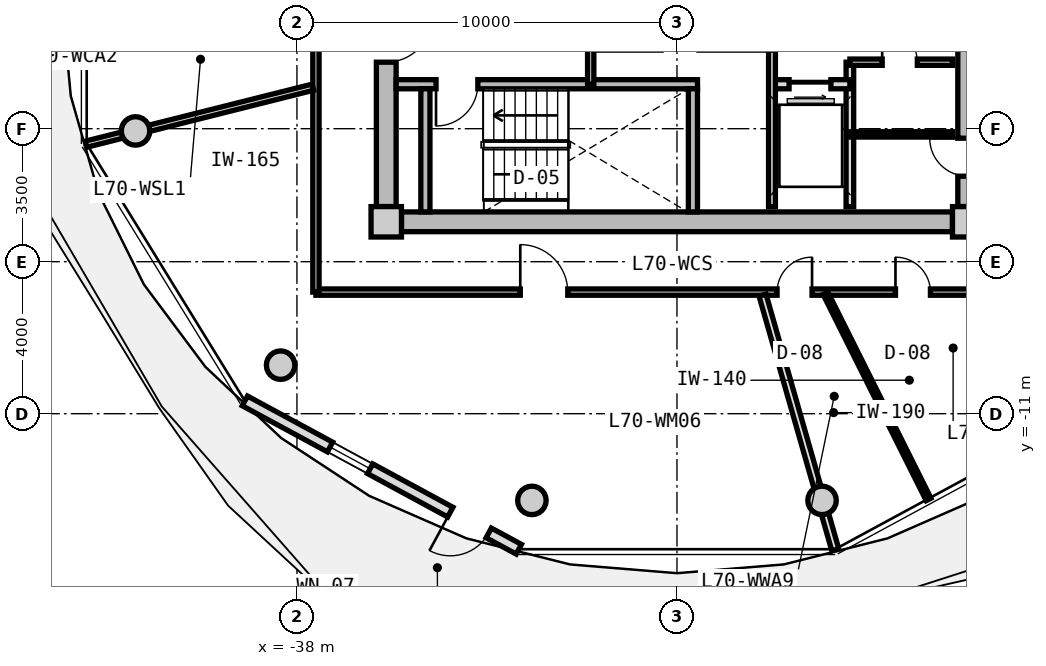
"""IFC4 building model, lengths in metres.
Left out: names, types, materials, properties, quantities, classifications, styles, units other than length and angle.
Written with IfcOpenShell. Run it as: python <this file> out.ifc"""

import sys

from ifc_helpers import new_model, si_unit, direction, frame, frame_2d, origin, origin_2d, place, context, subcontext, project, spatial, rectangle, circle, extrude, source, transform, mapped, element, fill, save


model = new_model("IFC4")
c1 = context("Model", 3, precision=1e-05, world=origin(), true_north=direction((0.0, 1.0)))
c2 = subcontext(c1, "Body", "Model", "MODEL_VIEW")
j1 = project(units=[si_unit("LENGTHUNIT", "METRE"), si_unit("PLANEANGLEUNIT", "RADIAN")], contexts=[c1])
p1 = place(None, origin())
s1 = spatial("IfcSite", under=j1, at=p1, CompositionType="ELEMENT")
p2 = place(p1, origin())
s2 = spatial("IfcBuilding", under=s1, at=p2, CompositionType="ELEMENT")
p3 = place(p2, frame((0.0, 0.0, 226.1)))
s3 = spatial("IfcBuildingStorey", under=s2, at=p3, CompositionType="ELEMENT", Elevation=226.1)
m1 = source(origin(), c2, "Body", "SweptSolid", [
    extrude(rectangle(XDim=0.8, YDim=0.8, at=origin_2d()), origin(), (0.0, 0.0, 1.0), 3.05),
])
for number, where, z_axis, x_axis in (
    (1, (-35.65, -5.95, 0.0), (0.0, 0.0, 1.0), (1.0, 0.0, 0.0)),
    (2, (-20.35, -5.95, 0.0), (0.0, 0.0, 1.0), (1.0, 0.0, 0.0)),
):
    element("IfcColumn", number, at=place(p3, frame(where, z_axis=z_axis, x_axis=x_axis)), inside=s3, PredefinedType="COLUMN", context=c2, shape_type="MappedRepresentation", body=[
        mapped(m1, transform((0.0, 0.0, 0.0), x_axis=(1.0, 0.0, 0.0), y_axis=(0.0, 1.0, 0.0), z_axis=(0.0, 0.0, 1.0), scale=1.0)),
    ])
m2 = source(origin(), c2, "Body", "SweptSolid", [
    extrude(rectangle(XDim=14.5, YDim=0.52, at=frame_2d((7.25, 0.0))), origin(), (0.0, 0.0, 1.0), 2.76),
])
p4 = place(p3, frame((-20.75, -5.95, 0.0), z_axis=(0.0, 0.0, 1.0), x_axis=(-1.0, 0.0, 0.0)))
e3 = element("IfcWall", 3, at=p4, inside=s3, PredefinedType="SHEAR", context=c2, shape_type="MappedRepresentation", body=[
    mapped(m2, transform((0.0, 0.0, 0.0), x_axis=(1.0, 0.0, 0.0), y_axis=(0.0, 1.0, 0.0), z_axis=(0.0, 0.0, 1.0), scale=1.0)),
])
m3 = source(origin(), c2, "Body", "SweptSolid", [
    extrude(rectangle(XDim=11.1, YDim=0.52, at=frame_2d((5.55, 0.0))), origin(), (0.0, 0.0, 1.0), 2.76),
])
p5 = place(p3, frame((-35.65, -5.55, 0.0), z_axis=(0.0, 0.0, 1.0), x_axis=(0.0, 1.0, 0.0)))
e4 = element("IfcWall", 4, at=p5, inside=s3, PredefinedType="SHEAR", context=c2, shape_type="MappedRepresentation", body=[
    mapped(m3, transform((0.0, 0.0, 0.0), x_axis=(1.0, 0.0, 0.0), y_axis=(0.0, 1.0, 0.0), z_axis=(0.0, 0.0, 1.0), scale=1.0)),
])
p6 = place(p5, frame((3.8, 0.0, 0.0)))
e5 = element("IfcOpeningElement", 5, at=p6, cuts=e4, PredefinedType="OPENING", context=c2, shape_type="SweptSolid", body=[
    extrude(rectangle(XDim=1.2, YDim=2.15, at=frame_2d((0.6, 1.075))), frame((0.0, 0.27, 0.0), z_axis=(0.0, -1.0, 0.0), x_axis=(1.0, 0.0, 0.0)), (0.0, 0.0, 1.0), 0.54),
])
p7 = place(p3, frame((-20.35, 5.55, 0.0), z_axis=(0.0, 0.0, 1.0), x_axis=(0.0, -1.0, 0.0)))
e6 = element("IfcWall", 6, at=p7, inside=s3, PredefinedType="SHEAR", context=c2, shape_type="MappedRepresentation", body=[
    mapped(m3, transform((0.0, 0.0, 0.0), x_axis=(1.0, 0.0, 0.0), y_axis=(0.0, 1.0, 0.0), z_axis=(0.0, 0.0, 1.0), scale=1.0)),
])
p8 = place(p7, frame((5.65, 0.0, 0.0)))
e7 = element("IfcOpeningElement", 7, at=p8, cuts=e6, PredefinedType="OPENING", context=c2, shape_type="SweptSolid", body=[
    extrude(rectangle(XDim=1.2, YDim=2.15, at=frame_2d((0.6, 1.075))), frame((0.0, 0.27, 0.0), z_axis=(0.0, -1.0, 0.0), x_axis=(1.0, 0.0, 0.0)), (0.0, 0.0, 1.0), 0.54),
])
p9 = place(p7, frame((9.3, 0.0, 0.0)))
e8 = element("IfcOpeningElement", 8, at=p9, cuts=e6, PredefinedType="OPENING", context=c2, shape_type="SweptSolid", body=[
    extrude(rectangle(XDim=1.0, YDim=2.1, at=frame_2d((0.5, 1.05))), frame((0.0, 0.27, 0.0), z_axis=(0.0, -1.0, 0.0), x_axis=(1.0, 0.0, 0.0)), (0.0, 0.0, 1.0), 0.54),
])
m4 = source(origin(), c2, "Body", "SweptSolid", [
    extrude(circle(Radius=0.375, at=origin_2d()), origin(), (0.0, 0.0, 1.0), 3.05),
])
for number, where, z_axis, x_axis in (
    (9, (-42.247, -3.559, 0.0), (0.0, 0.0, 1.0), (1.0, 0.0, 0.0)),
    (10, (-38.43, -9.723, 0.0), (0.0, 0.0, 1.0), (1.0, 0.0, 0.0)),
    (11, (-31.818, -13.281, 0.0), (0.0, 0.0, 1.0), (1.0, 0.0, 0.0)),
    (12, (-24.182, -13.281, 0.0), (0.0, 0.0, 1.0), (1.0, 0.0, 0.0)),
):
    element("IfcColumn", number, at=place(p3, frame(where, z_axis=z_axis, x_axis=x_axis)), inside=s3, PredefinedType="COLUMN", context=c2, shape_type="MappedRepresentation", body=[
        mapped(m4, transform((0.0, 0.0, 0.0), x_axis=(1.0, 0.0, 0.0), y_axis=(0.0, 1.0, 0.0), z_axis=(0.0, 0.0, 1.0), scale=1.0)),
    ])
m5 = source(origin(), c2, "Body", "SweptSolid", [
    extrude(rectangle(XDim=8.197, YDim=0.29, at=frame_2d((4.099, 0.0))), origin(), (0.0, 0.0, 1.0), 2.76),
])
p10 = place(p3, frame((-32.162, -14.566, 0.0), z_axis=(0.0, 0.0, 1.0), x_axis=(-0.879369910001, 0.476139224791, 0.0)))
e13 = element("IfcWall", 13, at=p10, inside=s3, PredefinedType="SOLIDWALL", context=c2, shape_type="MappedRepresentation", body=[
    mapped(m5, transform((0.0, 0.0, 0.0), x_axis=(1.0, 0.0, 0.0), y_axis=(0.0, 1.0, 0.0), z_axis=(0.0, 0.0, 1.0), scale=1.0)),
])
p11 = place(p10, frame((0.9, 0.0, 0.0)))
e14 = element("IfcOpeningElement", 14, at=p11, cuts=e13, PredefinedType="OPENING", context=c2, shape_type="SweptSolid", body=[
    extrude(rectangle(XDim=1.15, YDim=2.25, at=frame_2d((0.575, 1.125))), frame((0.0, 0.155, 0.0), z_axis=(0.0, -1.0, 0.0), x_axis=(1.0, 0.0, 0.0)), (0.0, 0.0, 1.0), 0.31),
])
p12 = place(p10, frame((4.448, 0.0, 0.85)))
e15 = element("IfcOpeningElement", 15, at=p12, cuts=e13, PredefinedType="OPENING", context=c2, shape_type="SweptSolid", body=[
    extrude(rectangle(XDim=1.2, YDim=1.5, at=frame_2d((0.6, 0.75))), frame((0.0, 0.155, 0.0), z_axis=(0.0, -1.0, 0.0), x_axis=(1.0, 0.0, 0.0)), (0.0, 0.0, 1.0), 0.31),
])
m6 = source(origin(), c2, "Body", "SweptSolid", [
    extrude(rectangle(XDim=7.93, YDim=0.24, at=frame_2d((3.965, 0.0))), origin(), (0.0, 0.0, 1.0), 2.76),
])
p13 = place(p3, frame((-35.39, -2.33, 0.0), z_axis=(0.0, 0.0, 1.0), x_axis=(1.0, 0.0, 0.0)))
e16 = element("IfcWall", 16, at=p13, inside=s3, PredefinedType="PARTITIONING", context=c2, shape_type="MappedRepresentation", body=[
    mapped(m6, transform((0.0, 0.0, 0.0), x_axis=(1.0, 0.0, 0.0), y_axis=(0.0, 1.0, 0.0), z_axis=(0.0, 0.0, 1.0), scale=1.0)),
])
p14 = place(p13, frame((1.05, 0.0, 0.0)))
e17 = element("IfcOpeningElement", 17, at=p14, cuts=e16, PredefinedType="OPENING", context=c2, shape_type="SweptSolid", body=[
    extrude(rectangle(XDim=1.1, YDim=2.15, at=frame_2d((0.55, 1.075))), frame((0.0, 0.13, 0.0), z_axis=(0.0, -1.0, 0.0), x_axis=(1.0, 0.0, 0.0)), (0.0, 0.0, 1.0), 0.26),
])
m7 = source(origin(), c2, "Body", "SweptSolid", [
    extrude(rectangle(XDim=3.24, YDim=0.24, at=frame_2d((1.62, 0.0))), origin(), (0.0, 0.0, 1.0), 2.76),
])
for number, where, z_axis, x_axis in (
    (18, (-34.62, -5.69, 0.0), (0.0, 0.0, 1.0), (0.0, 1.0, 0.0)),
    (19, (-27.58, -5.69, 0.0), (0.0, 0.0, 1.0), (0.0, 1.0, 0.0)),
):
    element("IfcWall", number, at=place(p3, frame(where, z_axis=z_axis, x_axis=x_axis)), inside=s3, PredefinedType="PARTITIONING", context=c2, shape_type="MappedRepresentation", body=[
        mapped(m7, transform((0.0, 0.0, 0.0), x_axis=(1.0, 0.0, 0.0), y_axis=(0.0, 1.0, 0.0), z_axis=(0.0, 0.0, 1.0), scale=1.0)),
    ])
m8 = source(origin(), c2, "Body", "SweptSolid", [
    extrude(rectangle(XDim=3.8, YDim=0.2, at=frame_2d((1.9, 0.0))), origin(), (0.0, 0.0, 1.0), 2.745),
])
p15 = place(p3, frame((-23.45, -5.55, 0.0), z_axis=(0.0, 0.0, 1.0), x_axis=(0.0, 1.0, 0.0)))
e20 = element("IfcWall", 20, at=p15, inside=s3, PredefinedType="PARTITIONING", context=c2, shape_type="MappedRepresentation", body=[
    mapped(m8, transform((0.0, 0.0, 0.0), x_axis=(1.0, 0.0, 0.0), y_axis=(0.0, 1.0, 0.0), z_axis=(0.0, 0.0, 1.0), scale=1.0)),
])
m9 = source(origin(), c2, "Body", "SweptSolid", [
    extrude(rectangle(XDim=2.05, YDim=0.24, at=frame_2d((1.025, 0.0))), origin(), (0.0, 0.0, 1.0), 2.745),
])
p16 = place(p3, frame((-25.5, -2.33, 0.0), z_axis=(0.0, 0.0, 1.0), x_axis=(1.0, 0.0, 0.0)))
e21 = element("IfcWall", 21, at=p16, inside=s3, PredefinedType="PARTITIONING", context=c2, shape_type="MappedRepresentation", body=[
    mapped(m9, transform((0.0, 0.0, 0.0), x_axis=(1.0, 0.0, 0.0), y_axis=(0.0, 1.0, 0.0), z_axis=(0.0, 0.0, 1.0), scale=1.0)),
])
p17 = place(p16, frame((0.45, 0.0, 0.0)))
e22 = element("IfcOpeningElement", 22, at=p17, cuts=e21, PredefinedType="OPENING", context=c2, shape_type="SweptSolid", body=[
    extrude(rectangle(XDim=1.1, YDim=2.2, at=frame_2d((0.55, 1.1))), frame((0.0, 0.13, 0.0), z_axis=(0.0, -1.0, 0.0), x_axis=(1.0, 0.0, 0.0)), (0.0, 0.0, 1.0), 0.26),
])
m10 = source(origin(), c2, "Body", "SweptSolid", [
    extrude(rectangle(XDim=4.2, YDim=0.18, at=frame_2d((2.1, 0.0))), origin(), (0.0, 0.0, 1.0), 2.745),
])
p18 = place(p3, frame((-25.5, -5.55, 0.0), z_axis=(0.0, 0.0, 1.0), x_axis=(0.0, 1.0, 0.0)))
e23 = element("IfcWall", 23, at=p18, inside=s3, PredefinedType="PARTITIONING", context=c2, shape_type="MappedRepresentation", body=[
    mapped(m10, transform((0.0, 0.0, 0.0), x_axis=(1.0, 0.0, 0.0), y_axis=(0.0, 1.0, 0.0), z_axis=(0.0, 0.0, 1.0), scale=1.0)),
])
m11 = source(origin(), c2, "Body", "SweptSolid", [
    extrude(rectangle(XDim=0.98, YDim=0.165, at=frame_2d((0.49, 0.0))), origin(), (0.0, 0.0, 1.0), 2.745),
])
p19 = place(p3, frame((-30.27, -2.33, 0.0), z_axis=(0.0, 0.0, 1.0), x_axis=(0.0, 1.0, 0.0)))
e24 = element("IfcWall", 24, at=p19, inside=s3, PredefinedType="PARTITIONING", context=c2, shape_type="MappedRepresentation", body=[
    mapped(m11, transform((0.0, 0.0, 0.0), x_axis=(1.0, 0.0, 0.0), y_axis=(0.0, 1.0, 0.0), z_axis=(0.0, 0.0, 1.0), scale=1.0)),
])
m12 = source(origin(), c2, "Body", "SweptSolid", [
    extrude(rectangle(XDim=2.7, YDim=0.165, at=frame_2d((1.35, 0.0))), origin(), (0.0, 0.0, 1.0), 2.745),
])
p20 = place(p3, frame((-23.45, -1.75, 0.0), z_axis=(0.0, 0.0, 1.0), x_axis=(1.0, 0.0, 0.0)))
e25 = element("IfcWall", 25, at=p20, inside=s3, PredefinedType="PARTITIONING", context=c2, shape_type="MappedRepresentation", body=[
    mapped(m12, transform((0.0, 0.0, 0.0), x_axis=(1.0, 0.0, 0.0), y_axis=(0.0, 1.0, 0.0), z_axis=(0.0, 0.0, 1.0), scale=1.0)),
])
p21 = place(p20, frame((0.85, 0.0, 0.0)))
e26 = element("IfcOpeningElement", 26, at=p21, cuts=e25, PredefinedType="OPENING", context=c2, shape_type="SweptSolid", body=[
    extrude(rectangle(XDim=0.925, YDim=2.1, at=frame_2d((0.462, 1.05))), frame((0.0, 0.093, 0.0), z_axis=(0.0, -1.0, 0.0), x_axis=(1.0, 0.0, 0.0)), (0.0, 0.0, 1.0), 0.185),
])
m13 = source(origin(), c2, "Body", "SweptSolid", [
    extrude(rectangle(XDim=2.7, YDim=0.14, at=frame_2d((1.35, 0.0))), origin(), (0.0, 0.0, 1.0), 2.745),
])
p22 = place(p3, frame((-23.45, -3.65, 0.0), z_axis=(0.0, 0.0, 1.0), x_axis=(1.0, 0.0, 0.0)))
e27 = element("IfcWall", 27, at=p22, inside=s3, PredefinedType="PARTITIONING", context=c2, shape_type="MappedRepresentation", body=[
    mapped(m13, transform((0.0, 0.0, 0.0), x_axis=(1.0, 0.0, 0.0), y_axis=(0.0, 1.0, 0.0), z_axis=(0.0, 0.0, 1.0), scale=1.0)),
])
m14 = source(origin(), c2, "Body", "SweptSolid", [
    extrude(rectangle(XDim=19.0, YDim=0.165, at=frame_2d((9.5, 0.0))), origin(), (0.0, 0.0, 1.0), 2.745),
])
p23 = place(p3, frame((-18.5, -7.8, 0.0), z_axis=(0.0, 0.0, 1.0), x_axis=(-1.0, 0.0, 0.0)))
e28 = element("IfcWall", 28, at=p23, inside=s3, PredefinedType="PARTITIONING", context=c2, shape_type="MappedRepresentation", body=[
    mapped(m14, transform((0.0, 0.0, 0.0), x_axis=(1.0, 0.0, 0.0), y_axis=(0.0, 1.0, 0.0), z_axis=(0.0, 0.0, 1.0), scale=1.0)),
])
p24 = place(p23, frame((12.373, 0.0, 0.0)))
e29 = element("IfcOpeningElement", 29, at=p24, cuts=e28, PredefinedType="OPENING", context=c2, shape_type="SweptSolid", body=[
    extrude(rectangle(XDim=1.25, YDim=2.2, at=frame_2d((0.625, 1.1))), frame((0.0, 0.093, 0.0), z_axis=(0.0, -1.0, 0.0), x_axis=(1.0, 0.0, 0.0)), (0.0, 0.0, 1.0), 0.185),
])
p25 = place(p23, frame((5.946, 0.0, 0.0)))
e30 = element("IfcOpeningElement", 30, at=p25, cuts=e28, PredefinedType="OPENING", context=c2, shape_type="SweptSolid", body=[
    extrude(rectangle(XDim=0.92, YDim=2.1, at=frame_2d((0.46, 1.05))), frame((0.0, 0.093, 0.0), z_axis=(0.0, -1.0, 0.0), x_axis=(1.0, 0.0, 0.0)), (0.0, 0.0, 1.0), 0.185),
])
p26 = place(p23, frame((2.83, 0.0, 0.0)))
e31 = element("IfcOpeningElement", 31, at=p26, cuts=e28, PredefinedType="OPENING", context=c2, shape_type="SweptSolid", body=[
    extrude(rectangle(XDim=0.92, YDim=2.1, at=frame_2d((0.46, 1.05))), frame((0.0, 0.093, 0.0), z_axis=(0.0, -1.0, 0.0), x_axis=(1.0, 0.0, 0.0)), (0.0, 0.0, 1.0), 0.185),
])
m15 = source(origin(), c2, "Body", "SweptSolid", [
    extrude(rectangle(XDim=6.88, YDim=0.165, at=frame_2d((3.44, 0.0))), origin(), (0.0, 0.0, 1.0), 2.745),
])
p27 = place(p3, frame((-37.5, -7.8, 0.0), z_axis=(0.0, 0.0, 1.0), x_axis=(0.0, 1.0, 0.0)))
e32 = element("IfcWall", 32, at=p27, inside=s3, PredefinedType="PARTITIONING", context=c2, shape_type="MappedRepresentation", body=[
    mapped(m15, transform((0.0, 0.0, 0.0), x_axis=(1.0, 0.0, 0.0), y_axis=(0.0, 1.0, 0.0), z_axis=(0.0, 0.0, 1.0), scale=1.0)),
])
m16 = source(origin(), c2, "Body", "SweptSolid", [
    extrude(rectangle(XDim=6.157, YDim=0.165, at=frame_2d((3.079, 0.0))), origin(), (0.0, 0.0, 1.0), 2.345),
])
p28 = place(p3, frame((-37.58, -2.407, 0.0), z_axis=(0.0, 0.0, 1.0), x_axis=(-0.969840867184, -0.243738984038, 0.0)))
e33 = element("IfcWall", 33, at=p28, inside=s3, PredefinedType="PARTITIONING", context=c2, shape_type="MappedRepresentation", body=[
    mapped(m16, transform((0.0, 0.0, 0.0), x_axis=(1.0, 0.0, 0.0), y_axis=(0.0, 1.0, 0.0), z_axis=(0.0, 0.0, 1.0), scale=1.0)),
])
m17 = source(origin(), c2, "Body", "SweptSolid", [
    extrude(rectangle(XDim=6.974, YDim=0.19, at=frame_2d((3.487, 0.0))), origin(), (0.0, 0.0, 1.0), 2.345),
])
p29 = place(p3, frame((-25.749, -7.88, 0.0), z_axis=(0.0, 0.0, 1.0), x_axis=(0.274707256801, -0.961527910703, 0.0)))
e34 = element("IfcWall", 34, at=p29, inside=s3, PredefinedType="PARTITIONING", context=c2, shape_type="MappedRepresentation", body=[
    mapped(m17, transform((0.0, 0.0, 0.0), x_axis=(1.0, 0.0, 0.0), y_axis=(0.0, 1.0, 0.0), z_axis=(0.0, 0.0, 1.0), scale=1.0)),
])
m18 = source(origin(), c2, "Body", "SweptSolid", [
    extrude(rectangle(XDim=6.067, YDim=0.14, at=frame_2d((3.034, 0.0))), origin(), (0.0, 0.0, 1.0), 2.745),
])
p30 = place(p3, frame((-24.093, -7.83, 0.0), z_axis=(0.0, 0.0, 1.0), x_axis=(0.447261882231, -0.894403046005, 0.0)))
e35 = element("IfcWall", 35, at=p30, inside=s3, PredefinedType="PARTITIONING", context=c2, shape_type="MappedRepresentation", body=[
    mapped(m18, transform((0.0, 0.0, 0.0), x_axis=(1.0, 0.0, 0.0), y_axis=(0.0, 1.0, 0.0), z_axis=(0.0, 0.0, 1.0), scale=1.0)),
])
m19 = source(origin(), c2, "Body", "SweptSolid", [
    extrude(rectangle(XDim=1.15, YDim=2.25, at=frame_2d((0.575, 1.125))), frame((0.0, 0.025, 0.0), z_axis=(0.0, -1.0, 0.0), x_axis=(1.0, 0.0, 0.0)), (0.0, 0.0, 1.0), 0.05),
])
p31 = place(p11, origin())
e36 = element("IfcDoor", 36, at=p31, inside=s3, OperationType="SINGLE_SWING_RIGHT", PredefinedType="DOOR", context=c2, shape_type="MappedRepresentation", body=[
    mapped(m19, transform((0.0, 0.0, 0.0), x_axis=(1.0, 0.0, 0.0), y_axis=(0.0, 1.0, 0.0), z_axis=(0.0, 0.0, 1.0), scale=1.0)),
])
fill(e14, e36)
m20 = source(origin(), c2, "Body", "SweptSolid", [
    extrude(rectangle(XDim=1.2, YDim=1.5, at=frame_2d((0.6, 0.75))), frame((0.0, 0.03, 0.0), z_axis=(0.0, -1.0, 0.0), x_axis=(1.0, 0.0, 0.0)), (0.0, 0.0, 1.0), 0.06),
])
p32 = place(p12, origin())
e37 = element("IfcWindow", 37, at=p32, inside=s3, PartitioningType="SINGLE_PANEL", PredefinedType="WINDOW", context=c2, shape_type="MappedRepresentation", body=[
    mapped(m20, transform((0.0, 0.0, 0.0), x_axis=(1.0, 0.0, 0.0), y_axis=(0.0, 1.0, 0.0), z_axis=(0.0, 0.0, 1.0), scale=1.0)),
])
fill(e15, e37)
m21 = source(origin(), c2, "Body", "SweptSolid", [
    extrude(rectangle(XDim=1.1, YDim=2.15, at=frame_2d((0.55, 1.075))), frame((0.0, 0.025, 0.0), z_axis=(0.0, -1.0, 0.0), x_axis=(1.0, 0.0, 0.0)), (0.0, 0.0, 1.0), 0.05),
])
p33 = place(p14, frame((1.1, 0.0, 0.0), z_axis=(0.0, 0.0, 1.0), x_axis=(-1.0, 0.0, 0.0)))
e38 = element("IfcDoor", 38, at=p33, inside=s3, OperationType="SINGLE_SWING_RIGHT", PredefinedType="DOOR", context=c2, shape_type="MappedRepresentation", body=[
    mapped(m21, transform((0.0, 0.0, 0.0), x_axis=(1.0, 0.0, 0.0), y_axis=(0.0, 1.0, 0.0), z_axis=(0.0, 0.0, 1.0), scale=1.0)),
])
fill(e17, e38)
m22 = source(origin(), c2, "Body", "SweptSolid", [
    extrude(rectangle(XDim=1.2, YDim=2.15, at=frame_2d((0.6, 1.075))), frame((0.0, 0.025, 0.0), z_axis=(0.0, -1.0, 0.0), x_axis=(1.0, 0.0, 0.0)), (0.0, 0.0, 1.0), 0.05),
])
p34 = place(p6, frame((1.2, 0.0, 0.0), z_axis=(0.0, 0.0, 1.0), x_axis=(-1.0, 0.0, 0.0)))
e39 = element("IfcDoor", 39, at=p34, inside=s3, OperationType="SINGLE_SWING_LEFT", PredefinedType="DOOR", context=c2, shape_type="MappedRepresentation", body=[
    mapped(m22, transform((0.0, 0.0, 0.0), x_axis=(1.0, 0.0, 0.0), y_axis=(0.0, 1.0, 0.0), z_axis=(0.0, 0.0, 1.0), scale=1.0)),
])
fill(e5, e39)
m23 = source(origin(), c2, "Body", "SweptSolid", [
    extrude(rectangle(XDim=1.1, YDim=2.2, at=frame_2d((0.55, 1.1))), frame((0.0, 0.025, 0.0), z_axis=(0.0, -1.0, 0.0), x_axis=(1.0, 0.0, 0.0)), (0.0, 0.0, 1.0), 0.05),
])
p35 = place(p17, frame((1.1, 0.0, 0.0), z_axis=(0.0, 0.0, 1.0), x_axis=(-1.0, 0.0, 0.0)))
e40 = element("IfcDoor", 40, at=p35, inside=s3, OperationType="SLIDING_TO_RIGHT", PredefinedType="DOOR", context=c2, shape_type="MappedRepresentation", body=[
    mapped(m23, transform((0.0, 0.0, 0.0), x_axis=(1.0, 0.0, 0.0), y_axis=(0.0, 1.0, 0.0), z_axis=(0.0, 0.0, 1.0), scale=1.0)),
])
fill(e22, e40)
m24 = source(origin(), c2, "Body", "SweptSolid", [
    extrude(rectangle(XDim=0.925, YDim=2.1, at=frame_2d((0.462, 1.05))), frame((0.0, 0.025, 0.0), z_axis=(0.0, -1.0, 0.0), x_axis=(1.0, 0.0, 0.0)), (0.0, 0.0, 1.0), 0.05),
])
p36 = place(p21, origin())
e41 = element("IfcDoor", 41, at=p36, inside=s3, OperationType="SINGLE_SWING_LEFT", PredefinedType="DOOR", context=c2, shape_type="MappedRepresentation", body=[
    mapped(m24, transform((0.0, 0.0, 0.0), x_axis=(1.0, 0.0, 0.0), y_axis=(0.0, 1.0, 0.0), z_axis=(0.0, 0.0, 1.0), scale=1.0)),
])
fill(e26, e41)
m25 = source(origin(), c2, "Body", "SweptSolid", [
    extrude(rectangle(XDim=1.25, YDim=2.2, at=frame_2d((0.625, 1.1))), frame((0.0, 0.025, 0.0), z_axis=(0.0, -1.0, 0.0), x_axis=(1.0, 0.0, 0.0)), (0.0, 0.0, 1.0), 0.05),
])
p37 = place(p24, frame((1.25, 0.0, 0.0), z_axis=(0.0, 0.0, 1.0), x_axis=(-1.0, 0.0, 0.0)))
e42 = element("IfcDoor", 42, at=p37, inside=s3, OperationType="SINGLE_SWING_LEFT", PredefinedType="DOOR", context=c2, shape_type="MappedRepresentation", body=[
    mapped(m25, transform((0.0, 0.0, 0.0), x_axis=(1.0, 0.0, 0.0), y_axis=(0.0, 1.0, 0.0), z_axis=(0.0, 0.0, 1.0), scale=1.0)),
])
fill(e29, e42)
m26 = source(origin(), c2, "Body", "SweptSolid", [
    extrude(rectangle(XDim=0.92, YDim=2.1, at=frame_2d((0.46, 1.05))), frame((0.0, 0.025, 0.0), z_axis=(0.0, -1.0, 0.0), x_axis=(1.0, 0.0, 0.0)), (0.0, 0.0, 1.0), 0.05),
])
p38 = place(p25, frame((0.92, 0.0, 0.0), z_axis=(0.0, 0.0, 1.0), x_axis=(-1.0, 0.0, 0.0)))
e43 = element("IfcDoor", 43, at=p38, inside=s3, OperationType="SINGLE_SWING_RIGHT", PredefinedType="DOOR", context=c2, shape_type="MappedRepresentation", body=[
    mapped(m26, transform((0.0, 0.0, 0.0), x_axis=(1.0, 0.0, 0.0), y_axis=(0.0, 1.0, 0.0), z_axis=(0.0, 0.0, 1.0), scale=1.0)),
])
fill(e30, e43)
p39 = place(p26, frame((0.92, 0.0, 0.0), z_axis=(0.0, 0.0, 1.0), x_axis=(-1.0, 0.0, 0.0)))
e44 = element("IfcDoor", 44, at=p39, inside=s3, OperationType="SINGLE_SWING_LEFT", PredefinedType="DOOR", context=c2, shape_type="MappedRepresentation", body=[
    mapped(m26, transform((0.0, 0.0, 0.0), x_axis=(1.0, 0.0, 0.0), y_axis=(0.0, 1.0, 0.0), z_axis=(0.0, 0.0, 1.0), scale=1.0)),
])
fill(e31, e44)
save(model, sys.argv[1])
